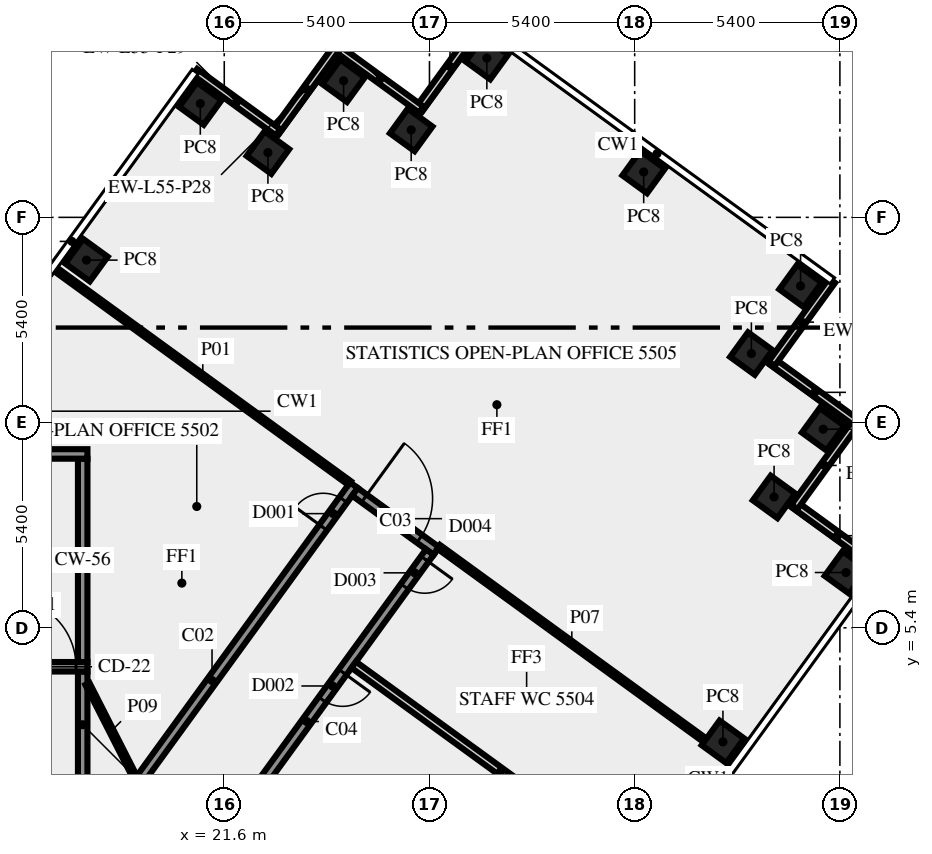
"""IFC4 building model, lengths in metres.
Left out: names, types, materials, properties, quantities, classifications, styles, units other than length and angle.
Written with IfcOpenShell. Run it as: python <this file> out.ifc"""

import sys

from ifc_helpers import new_model, si_unit, direction, frame, frame_2d, origin, origin_2d, place, context, subcontext, project, spatial, rectangle, extrude, element, fill, save


model = new_model("IFC4")
c1 = context("Model", 3, precision=1e-05, world=origin(), true_north=direction((0.0, 1.0)))
c2 = subcontext(c1, "Body", "Model", "MODEL_VIEW")
j1 = project(units=[si_unit("LENGTHUNIT", "METRE"), si_unit("PLANEANGLEUNIT", "RADIAN")], contexts=[c1])
p1 = place(None, origin())
s1 = spatial("IfcSite", under=j1, at=p1, CompositionType="ELEMENT")
p2 = place(p1, origin())
s2 = spatial("IfcBuilding", under=s1, at=p2, CompositionType="ELEMENT")
p3 = place(p2, frame((0.0, 0.0, 234.0)))
s3 = spatial("IfcBuildingStorey", under=s2, at=p3, CompositionType="ELEMENT", Elevation=234.0)
for number, where, z_axis, x_axis in (
    (1, (34.722, 2.4, 0.0), (0.0, 0.0, 1.0), (0.588, 0.809, 0.0)),
    (2, (37.96, 6.855, 0.0), (0.0, 0.0, 1.0), (0.588, 0.809, 0.0)),
    (3, (36.068, 8.844, 0.0), (0.0, 0.0, 1.0), (0.588, 0.809, 0.0)),
    (4, (37.36, 10.625, 0.0), (0.0, 0.0, 1.0), (0.588, 0.809, 0.0)),
    (5, (35.471, 12.616, 0.0), (0.0, 0.0, 1.0), (-0.809, 0.588, 0.0)),
    (6, (36.765, 14.395, 0.0), (0.0, 0.0, 1.0), (-0.809, 0.588, 0.0)),
    (7, (32.637, 17.393, 0.0), (0.0, 0.0, 1.0), (-0.809, 0.588, 0.0)),
    (8, (28.51, 20.39, 0.0), (0.0, 0.0, 1.0), (-0.588, -0.809, 0.0)),
    (9, (26.519, 18.5, 0.0), (0.0, 0.0, 1.0), (-0.809, 0.588, 0.0)),
    (10, (24.74, 19.795, 0.0), (0.0, 0.0, 1.0), (-0.588, -0.809, 0.0)),
    (11, (22.749, 17.904, 0.0), (0.0, 0.0, 1.0), (-0.588, -0.809, 0.0)),
    (12, (20.97, 19.195, 0.0), (0.0, 0.0, 1.0), (-0.588, -0.809, 0.0)),
    (13, (17.974, 15.075, 0.0), (0.0, 0.0, 1.0), (-0.588, -0.809, 0.0)),
):
    element("IfcColumn", number, at=place(p3, frame(where, z_axis=z_axis, x_axis=x_axis)), inside=s3, PredefinedType="COLUMN", context=c2, shape_type="SweptSolid", body=[
        extrude(rectangle(XDim=0.8, YDim=0.8, at=origin_2d()), origin(), (0.0, 0.0, 1.0), 3.65),
    ])
for number, where, z_axis, x_axis in (
    (14, (38.829, 7.031, 0.0), (0.0, 0.0, 1.0), (-0.809, 0.588, 0.0)),
    (15, (36.602, 8.58, 0.0), (0.0, 0.0, 1.0), (0.588, 0.809, 0.0)),
    (16, (38.231, 10.802, 0.0), (0.0, 0.0, 1.0), (-0.809, 0.588, 0.0)),
    (17, (36.005, 12.352, 0.0), (0.0, 0.0, 1.0), (0.588, 0.809, 0.0)),
    (18, (28.334, 21.262, 0.0), (0.0, 0.0, 1.0), (-0.588, -0.809, 0.0)),
):
    element("IfcWall", number, at=place(p3, frame(where, z_axis=z_axis, x_axis=x_axis)), inside=s3, PredefinedType="SOLIDWALL", context=c2, shape_type="SweptSolid", body=[
        extrude(rectangle(XDim=2.7, YDim=0.2, at=frame_2d((1.35, 0.0))), origin(), (0.0, 0.0, 1.0), 3.65),
    ])
p4 = place(p3, frame((26.785, 19.036, 0.0), z_axis=(0.0, 0.0, 1.0), x_axis=(-0.809064397168, 0.587720002413, 0.0)))
e19 = element("IfcWall", 19, at=p4, inside=s3, PredefinedType="SOLIDWALL", context=c2, shape_type="SweptSolid", body=[
    extrude(rectangle(XDim=2.7, YDim=0.2, at=frame_2d((1.35, 0.0))), origin(), (0.0, 0.0, 1.0), 3.65),
])
for number, where, z_axis, x_axis in (
    (20, (24.563, 20.665, 0.0), (0.0, 0.0, 1.0), (-0.588, -0.809, 0.0)),
    (21, (23.013, 18.438, 0.0), (0.0, 0.0, 1.0), (-0.809, 0.588, 0.0)),
):
    element("IfcWall", number, at=place(p3, frame(where, z_axis=z_axis, x_axis=x_axis)), inside=s3, PredefinedType="SOLIDWALL", context=c2, shape_type="SweptSolid", body=[
        extrude(rectangle(XDim=2.7, YDim=0.2, at=frame_2d((1.35, 0.0))), origin(), (0.0, 0.0, 1.0), 3.65),
    ])
p5 = place(p3, frame((17.875, 1.45, 0.0), z_axis=(0.0, 0.0, 1.0), x_axis=(0.0, 1.0, 0.0)))
e22 = element("IfcWall", 22, at=p5, inside=s3, PredefinedType="SHEAR", context=c2, shape_type="SweptSolid", body=[
    extrude(rectangle(XDim=2.8, YDim=0.25, at=frame_2d((1.4, 0.0))), origin(), (0.0, 0.0, 1.0), 3.65),
])
p6 = place(p3, frame((7.5, 4.375, 0.0), z_axis=(0.0, 0.0, 1.0), x_axis=(1.0, 0.0, 0.0)))
e23 = element("IfcWall", 23, at=p6, inside=s3, PredefinedType="SHEAR", context=c2, shape_type="SweptSolid", body=[
    extrude(rectangle(XDim=10.5, YDim=0.25, at=frame_2d((5.25, 0.0))), origin(), (0.0, 0.0, 1.0), 3.65),
])
p7 = place(p6, frame((8.4, 0.0, 0.0)))
e24 = element("IfcOpeningElement", 24, at=p7, cuts=e23, PredefinedType="OPENING", context=c2, shape_type="SweptSolid", body=[
    extrude(rectangle(XDim=1.8, YDim=2.1, at=frame_2d((0.9, 1.05))), frame((0.0, 0.135, 0.0), z_axis=(0.0, -1.0, 0.0), x_axis=(1.0, 0.0, 0.0)), (0.0, 0.0, 1.0), 0.27),
])
p8 = place(p3, frame((17.875, 4.5, 0.0), z_axis=(0.0, 0.0, 1.0), x_axis=(0.0, 1.0, 0.0)))
e25 = element("IfcWall", 25, at=p8, inside=s3, PredefinedType="SHEAR", context=c2, shape_type="SweptSolid", body=[
    extrude(rectangle(XDim=5.35, YDim=0.25, at=frame_2d((2.675, 0.0))), origin(), (0.0, 0.0, 1.0), 3.65),
])
p9 = place(p3, frame((7.5, 9.975, 0.0), z_axis=(0.0, 0.0, 1.0), x_axis=(1.0, 0.0, 0.0)))
e26 = element("IfcWall", 26, at=p9, inside=s3, PredefinedType="SHEAR", context=c2, shape_type="SweptSolid", body=[
    extrude(rectangle(XDim=10.5, YDim=0.25, at=frame_2d((5.25, 0.0))), origin(), (0.0, 0.0, 1.0), 3.65),
])
p10 = place(p9, frame((2.0, 0.0, 1.0)))
e27 = element("IfcOpeningElement", 27, at=p10, cuts=e26, PredefinedType="OPENING", context=c2, shape_type="SweptSolid", body=[
    extrude(rectangle(XDim=1.2, YDim=1.2, at=frame_2d((0.6, 0.6))), frame((0.0, 0.135, 0.0), z_axis=(0.0, -1.0, 0.0), x_axis=(1.0, 0.0, 0.0)), (0.0, 0.0, 1.0), 0.27),
])
p11 = place(p3, frame((17.545, -1.125, 0.0), z_axis=(0.0, 0.0, 1.0), x_axis=(0.587796810203, 0.809008596935, 0.0)))
e28 = element("IfcWall", 28, at=p11, inside=s3, PredefinedType="SOLIDWALL", context=c2, shape_type="SweptSolid", body=[
    extrude(rectangle(XDim=12.703, YDim=0.25, at=frame_2d((6.352, 0.0))), origin(), (0.0, 0.0, 1.0), 3.65),
])
p12 = place(p11, frame((11.329, 0.0, 0.0)))
e29 = element("IfcOpeningElement", 29, at=p12, cuts=e28, PredefinedType="OPENING", context=c2, shape_type="SweptSolid", body=[
    extrude(rectangle(XDim=0.9, YDim=2.1, at=frame_2d((0.45, 1.05))), frame((0.0, 0.135, 0.0), z_axis=(0.0, -1.0, 0.0), x_axis=(1.0, 0.0, 0.0)), (0.0, 0.0, 1.0), 0.27),
])
p13 = place(p3, frame((25.039, 8.978, 0.0), z_axis=(0.0, 0.0, 1.0), x_axis=(0.809006914995, -0.587799125119, 0.0)))
e30 = element("IfcWall", 30, at=p13, inside=s3, PredefinedType="SOLIDWALL", context=c2, shape_type="SweptSolid", body=[
    extrude(rectangle(XDim=2.65, YDim=0.25, at=frame_2d((1.325, 0.0))), origin(), (0.0, 0.0, 1.0), 3.65),
])
p14 = place(p13, frame((0.301, 0.0, 0.0)))
e31 = element("IfcOpeningElement", 31, at=p14, cuts=e30, PredefinedType="OPENING", context=c2, shape_type="SweptSolid", body=[
    extrude(rectangle(XDim=1.8, YDim=2.1, at=frame_2d((0.9, 1.05))), frame((0.0, 0.135, 0.0), z_axis=(0.0, -1.0, 0.0), x_axis=(1.0, 0.0, 0.0)), (0.0, 0.0, 1.0), 0.27),
])
p15 = place(p3, frame((27.009, 7.392, 0.0), z_axis=(0.0, 0.0, 1.0), x_axis=(-0.587776457057, -0.809023384414, 0.0)))
e32 = element("IfcWall", 32, at=p15, inside=s3, PredefinedType="SOLIDWALL", context=c2, shape_type="SweptSolid", body=[
    extrude(rectangle(XDim=11.021, YDim=0.25, at=frame_2d((5.51, 0.0))), origin(), (0.0, 0.0, 1.0), 3.65),
])
p16 = place(p15, frame((3.905, 0.0, 0.0)))
e33 = element("IfcOpeningElement", 33, at=p16, cuts=e32, PredefinedType="OPENING", context=c2, shape_type="SweptSolid", body=[
    extrude(rectangle(XDim=0.9, YDim=2.1, at=frame_2d((0.45, 1.05))), frame((0.0, 0.135, 0.0), z_axis=(0.0, -1.0, 0.0), x_axis=(1.0, 0.0, 0.0)), (0.0, 0.0, 1.0), 0.27),
])
p17 = place(p15, frame((0.225, 0.0, 0.0)))
e34 = element("IfcOpeningElement", 34, at=p17, cuts=e32, PredefinedType="OPENING", context=c2, shape_type="SweptSolid", body=[
    extrude(rectangle(XDim=0.9, YDim=2.1, at=frame_2d((0.45, 1.05))), frame((0.0, 0.135, 0.0), z_axis=(0.0, -1.0, 0.0), x_axis=(1.0, 0.0, 0.0)), (0.0, 0.0, 1.0), 0.27),
])
p18 = place(p3, frame((24.898, 9.209, 0.0), z_axis=(0.0, 0.0, 1.0), x_axis=(-0.809013490065, 0.587790075531, 0.0)))
e35 = element("IfcWall", 35, at=p18, inside=s3, PredefinedType="PARTITIONING", context=c2, shape_type="SweptSolid", body=[
    extrude(rectangle(XDim=9.549, YDim=0.12, at=frame_2d((4.775, 0.0))), origin(), (0.0, 0.0, 1.0), 2.85),
])
p19 = place(p3, frame((27.24, 7.532, 0.0), z_axis=(0.0, 0.0, 1.0), x_axis=(0.809033281668, -0.587762834103, 0.0)))
e36 = element("IfcWall", 36, at=p19, inside=s3, PredefinedType="PARTITIONING", context=c2, shape_type="SweptSolid", body=[
    extrude(rectangle(XDim=8.665, YDim=0.12, at=frame_2d((4.333, 0.0))), origin(), (0.0, 0.0, 1.0), 3.65),
])
p20 = place(p3, frame((32.734, -1.187, 0.0), z_axis=(0.0, 0.0, 1.0), x_axis=(-0.808994684961, 0.587815957341, 0.0)))
e37 = element("IfcWall", 37, at=p20, inside=s3, PredefinedType="SOLIDWALL", context=c2, shape_type="SweptSolid", body=[
    extrude(rectangle(XDim=9.55, YDim=0.2, at=frame_2d((4.775, 0.0))), origin(), (0.0, 0.0, 1.0), 2.85),
])
p21 = place(p3, frame((18.0, 3.925, 0.0), z_axis=(0.0, 0.0, 1.0), x_axis=(0.453950796792, -0.891026752736, 0.0)))
e38 = element("IfcWall", 38, at=p21, inside=s3, PredefinedType="PARTITIONING", context=c2, shape_type="SweptSolid", body=[
    extrude(rectangle(XDim=2.778, YDim=0.12, at=frame_2d((1.389, 0.0))), origin(), (0.0, 0.0, 1.0), 3.65),
])
p22 = place(p7, origin())
e39 = element("IfcDoor", 39, at=p22, inside=s3, OperationType="DOUBLE_DOOR_SINGLE_SWING", PredefinedType="DOOR", context=c2, shape_type="SweptSolid", body=[
    extrude(rectangle(XDim=1.8, YDim=2.1, at=frame_2d((0.9, 1.05))), frame((0.0, 0.025, 0.0), z_axis=(0.0, -1.0, 0.0), x_axis=(1.0, 0.0, 0.0)), (0.0, 0.0, 1.0), 0.05),
])
fill(e24, e39)
p23 = place(p12, origin())
e40 = element("IfcDoor", 40, at=p23, inside=s3, OperationType="SINGLE_SWING_RIGHT", PredefinedType="DOOR", context=c2, shape_type="SweptSolid", body=[
    extrude(rectangle(XDim=0.9, YDim=2.1, at=frame_2d((0.45, 1.05))), frame((0.0, 0.025, 0.0), z_axis=(0.0, -1.0, 0.0), x_axis=(1.0, 0.0, 0.0)), (0.0, 0.0, 1.0), 0.05),
])
fill(e29, e40)
p24 = place(p14, origin())
e41 = element("IfcDoor", 41, at=p24, inside=s3, OperationType="DOUBLE_DOOR_SINGLE_SWING", PredefinedType="DOOR", context=c2, shape_type="SweptSolid", body=[
    extrude(rectangle(XDim=1.8, YDim=2.1, at=frame_2d((0.9, 1.05))), frame((0.0, 0.025, 0.0), z_axis=(0.0, -1.0, 0.0), x_axis=(1.0, 0.0, 0.0)), (0.0, 0.0, 1.0), 0.05),
])
fill(e31, e41)
p25 = place(p16, origin())
e42 = element("IfcDoor", 42, at=p25, inside=s3, OperationType="SINGLE_SWING_LEFT", PredefinedType="DOOR", context=c2, shape_type="SweptSolid", body=[
    extrude(rectangle(XDim=0.9, YDim=2.1, at=frame_2d((0.45, 1.05))), frame((0.0, 0.025, 0.0), z_axis=(0.0, -1.0, 0.0), x_axis=(1.0, 0.0, 0.0)), (0.0, 0.0, 1.0), 0.05),
])
fill(e33, e42)
p26 = place(p17, origin())
e43 = element("IfcDoor", 43, at=p26, inside=s3, OperationType="SINGLE_SWING_LEFT", PredefinedType="DOOR", context=c2, shape_type="SweptSolid", body=[
    extrude(rectangle(XDim=0.9, YDim=2.1, at=frame_2d((0.45, 1.05))), frame((0.0, 0.025, 0.0), z_axis=(0.0, -1.0, 0.0), x_axis=(1.0, 0.0, 0.0)), (0.0, 0.0, 1.0), 0.05),
])
fill(e34, e43)
save(model, sys.argv[1])
